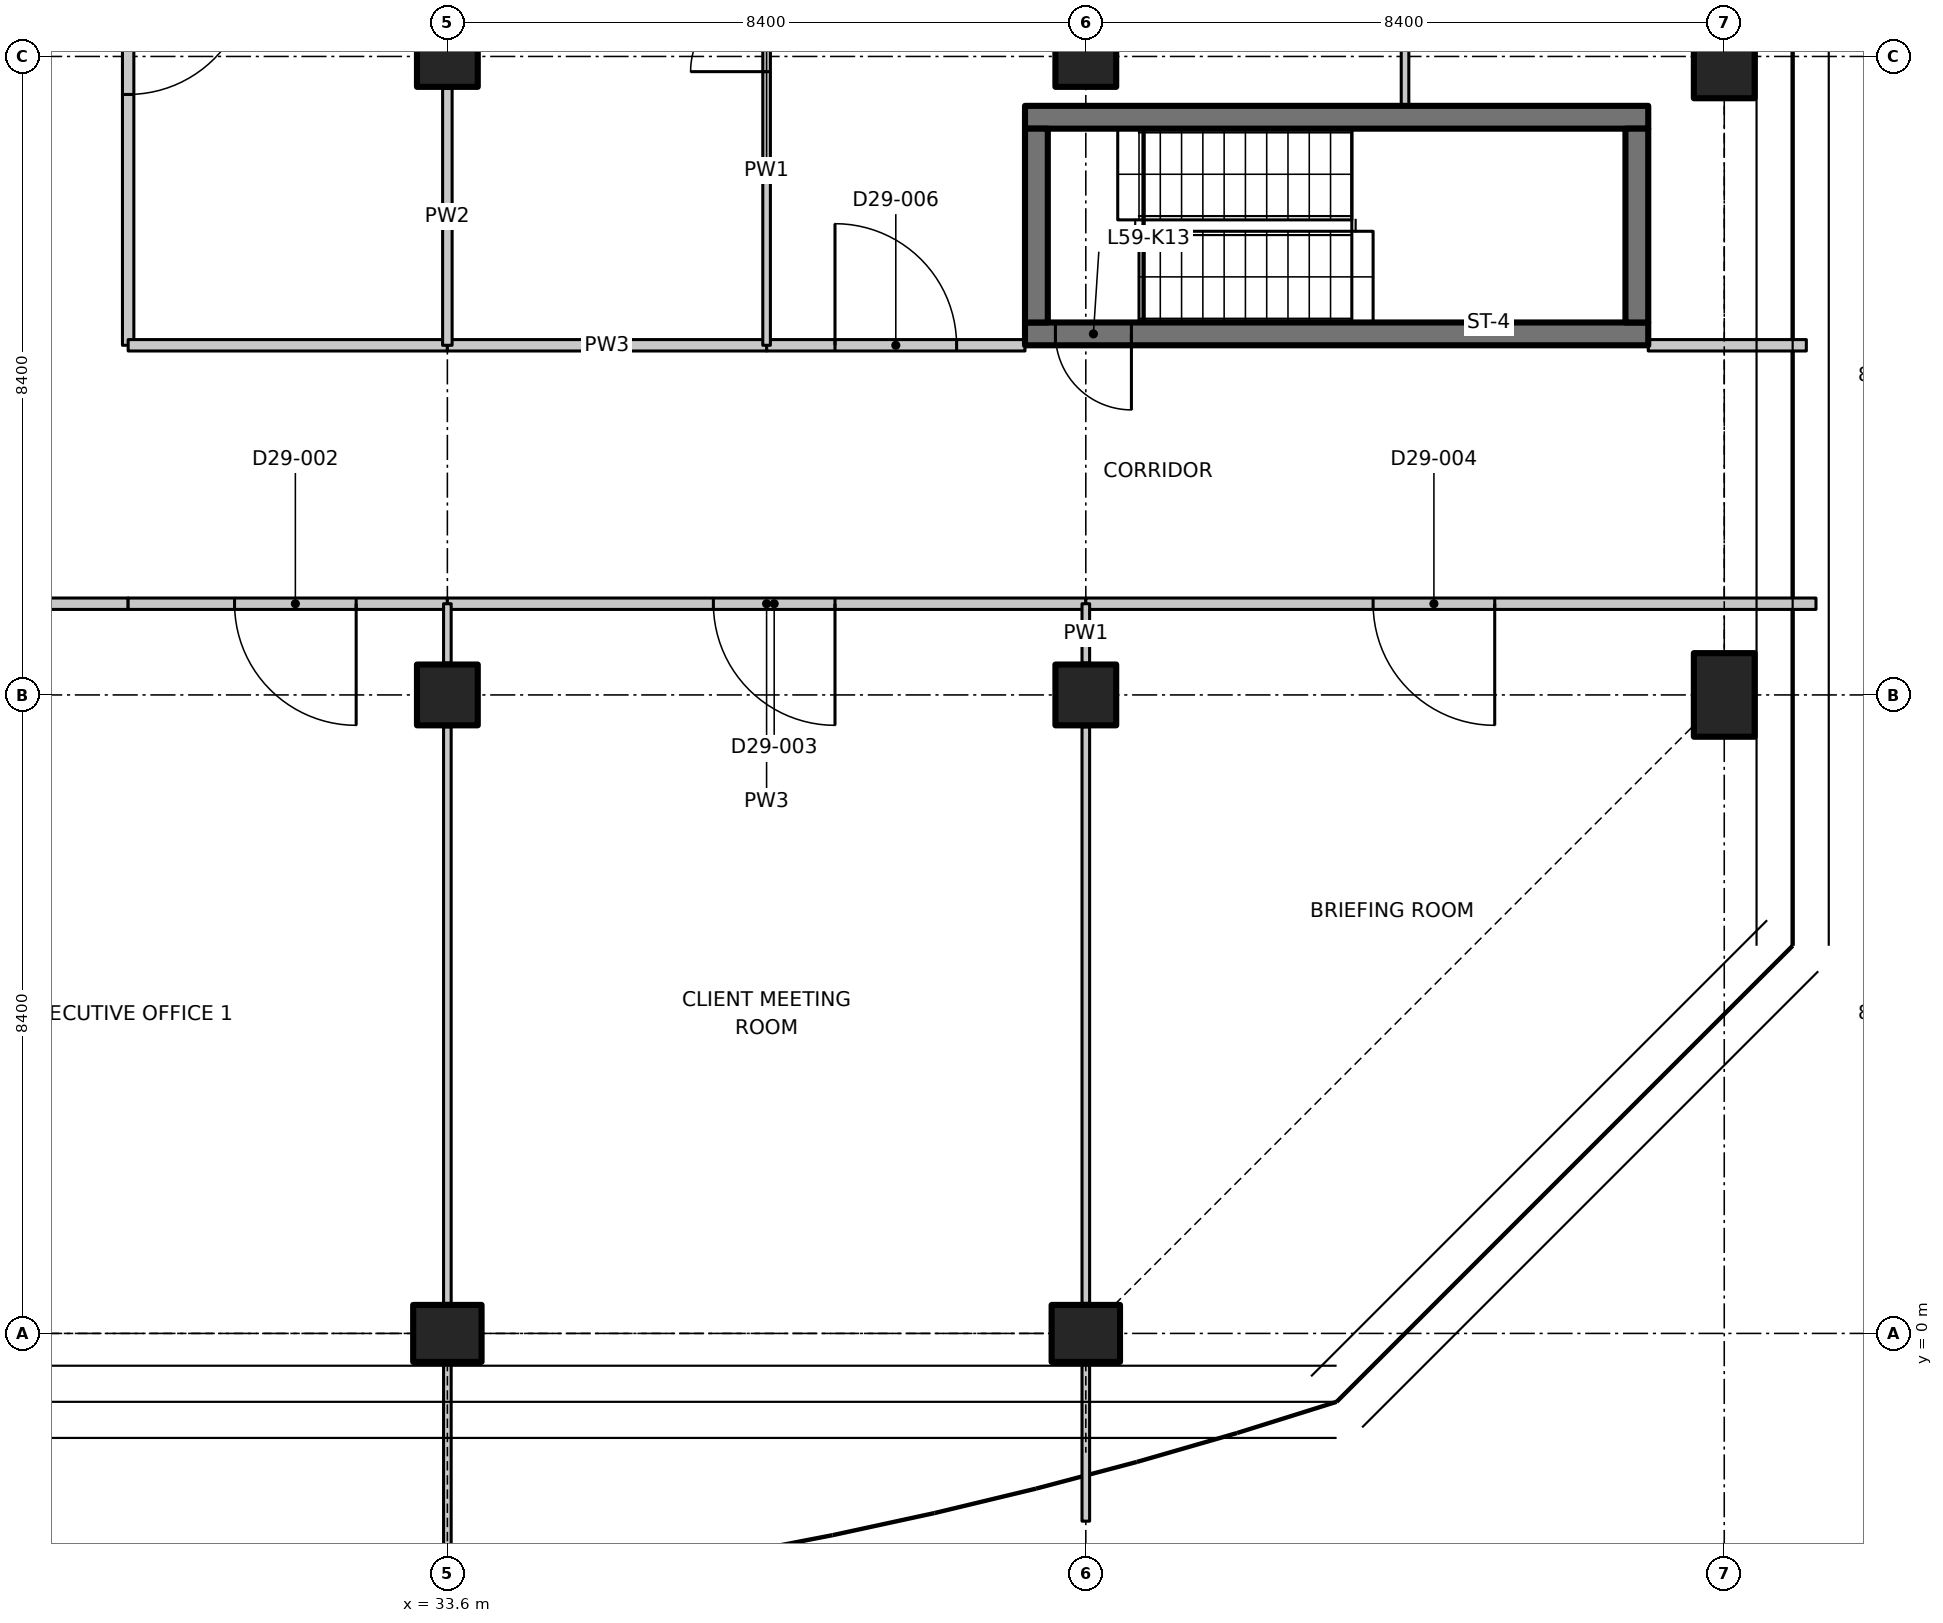
"""IFC4 building model, lengths in metres.
Left out: names, types, materials, properties, quantities, classifications, styles, units other than length and angle.
Written with IfcOpenShell. Run it as: python <this file> out.ifc"""

import sys

from ifc_helpers import new_model, si_unit, direction, frame, frame_2d, origin, origin_2d, place, context, subcontext, project, spatial, polyline, rectangle, outline, extrude, element, fill, save


model = new_model("IFC4")
c1 = context("Model", 3, precision=1e-05, world=origin(), true_north=direction((0.0, 1.0)))
c2 = subcontext(c1, "Body", "Model", "MODEL_VIEW")
j1 = project(units=[si_unit("LENGTHUNIT", "METRE"), si_unit("PLANEANGLEUNIT", "RADIAN")], contexts=[c1])
p1 = place(None, origin())
s1 = spatial("IfcSite", under=j1, at=p1, CompositionType="ELEMENT")
p2 = place(p1, origin())
s2 = spatial("IfcBuilding", under=s1, at=p2, CompositionType="ELEMENT")
p3 = place(p2, frame((0.0, 0.0, 233.7)))
s3 = spatial("IfcBuildingStorey", under=s2, at=p3, CompositionType="ELEMENT", Elevation=233.7)
p4 = place(p3, frame((33.6, 0.0, 0.0), z_axis=(0.0, 0.0, 1.0), x_axis=(0.0, 1.0, 0.0)))
e1 = element("IfcColumn", 1, at=p4, inside=s3, PredefinedType="COLUMN", context=c2, shape_type="SweptSolid", body=[
    extrude(rectangle(XDim=0.75, YDim=0.9, at=origin_2d()), origin(), (0.0, 0.0, 1.0), 3.35),
])
for number, where, z_axis, x_axis in (
    (2, (33.6, 8.4, 0.0), (0.0, 0.0, 1.0), (1.0, 0.0, 0.0)),
    (3, (33.6, 16.8, 0.0), (0.0, 0.0, 1.0), (1.0, 0.0, 0.0)),
):
    element("IfcColumn", number, at=place(p3, frame(where, z_axis=z_axis, x_axis=x_axis)), inside=s3, PredefinedType="COLUMN", context=c2, shape_type="SweptSolid", body=[
        extrude(rectangle(XDim=0.8, YDim=0.8, at=origin_2d()), origin(), (0.0, 0.0, 1.0), 3.35),
    ])
p5 = place(p3, frame((42.0, 0.0, 0.0), z_axis=(0.0, 0.0, 1.0), x_axis=(0.0, 1.0, 0.0)))
e4 = element("IfcColumn", 4, at=p5, inside=s3, PredefinedType="COLUMN", context=c2, shape_type="SweptSolid", body=[
    extrude(rectangle(XDim=0.75, YDim=0.9, at=origin_2d()), origin(), (0.0, 0.0, 1.0), 3.35),
])
for number, where, z_axis, x_axis in (
    (5, (42.0, 8.4, 0.0), (0.0, 0.0, 1.0), (1.0, 0.0, 0.0)),
    (6, (42.0, 16.8, 0.0), (0.0, 0.0, 1.0), (1.0, 0.0, 0.0)),
):
    element("IfcColumn", number, at=place(p3, frame(where, z_axis=z_axis, x_axis=x_axis)), inside=s3, PredefinedType="COLUMN", context=c2, shape_type="SweptSolid", body=[
        extrude(rectangle(XDim=0.8, YDim=0.8, at=origin_2d()), origin(), (0.0, 0.0, 1.0), 3.35),
    ])
for number, where, z_axis, x_axis in (
    (7, (50.4, 8.4, 0.0), (0.0, 0.0, 1.0), (1.0, 0.0, 0.0)),
    (8, (50.4, 16.8, 0.0), (0.0, 0.0, 1.0), (1.0, 0.0, 0.0)),
):
    element("IfcColumn", number, at=place(p3, frame(where, z_axis=z_axis, x_axis=x_axis)), inside=s3, PredefinedType="COLUMN", context=c2, shape_type="SweptSolid", body=[
        extrude(rectangle(XDim=0.8, YDim=1.1, at=origin_2d()), origin(), (0.0, 0.0, 1.0), 3.35),
    ])
p6 = place(p3, frame((49.4, 13.15, 0.0), z_axis=(0.0, 0.0, 1.0), x_axis=(-1.0, 0.0, 0.0)))
e9 = element("IfcWall", 9, at=p6, inside=s3, PredefinedType="SHEAR", context=c2, shape_type="SweptSolid", body=[
    extrude(rectangle(XDim=8.2, YDim=0.3, at=frame_2d((4.1, 0.0))), origin(), (0.0, 0.0, 1.0), 3.35),
])
p7 = place(p6, frame((6.8, 0.0, 0.0)))
e10 = element("IfcOpeningElement", 10, at=p7, cuts=e9, PredefinedType="OPENING", context=c2, shape_type="SweptSolid", body=[
    extrude(rectangle(XDim=1.0, YDim=2.1, at=frame_2d((0.5, 1.05))), frame((0.0, 0.16, 0.0), z_axis=(0.0, -1.0, 0.0), x_axis=(1.0, 0.0, 0.0)), (0.0, 0.0, 1.0), 0.32),
])
p8 = place(p3, frame((41.2, 16.0, 0.0), z_axis=(0.0, 0.0, 1.0), x_axis=(1.0, 0.0, 0.0)))
e11 = element("IfcWall", 11, at=p8, inside=s3, PredefinedType="SHEAR", context=c2, shape_type="SweptSolid", body=[
    extrude(rectangle(XDim=8.2, YDim=0.3, at=frame_2d((4.1, 0.0))), origin(), (0.0, 0.0, 1.0), 3.35),
])
for number, where, z_axis, x_axis in (
    (12, (41.35, 13.3, 0.0), (0.0, 0.0, 1.0), (0.0, 1.0, 0.0)),
    (13, (49.25, 13.3, 0.0), (0.0, 0.0, 1.0), (0.0, 1.0, 0.0)),
):
    element("IfcWall", number, at=place(p3, frame(where, z_axis=z_axis, x_axis=x_axis)), inside=s3, PredefinedType="SHEAR", context=c2, shape_type="SweptSolid", body=[
        extrude(rectangle(XDim=2.55, YDim=0.3, at=frame_2d((1.275, 0.0))), origin(), (0.0, 0.0, 1.0), 3.35),
    ])
p9 = place(p3, frame((29.4, 9.6, 0.0), z_axis=(0.0, 0.0, 1.0), x_axis=(-1.0, 0.0, 0.0)))
e14 = element("IfcWall", 14, at=p9, inside=s3, PredefinedType="PARTITIONING", context=c2, shape_type="SweptSolid", body=[
    extrude(rectangle(XDim=4.2, YDim=0.15, at=frame_2d((2.1, 0.0))), origin(), (0.0, 0.0, 1.0), 3.33),
])
p10 = place(p3, frame((29.4, 21.2, 0.0), z_axis=(0.0, 0.0, 1.0), x_axis=(0.0, -1.0, 0.0)))
e15 = element("IfcWall", 15, at=p10, inside=s3, PredefinedType="PARTITIONING", context=c2, shape_type="SweptSolid", body=[
    extrude(rectangle(XDim=8.2, YDim=0.15, at=frame_2d((4.1, 0.0))), origin(), (0.0, 0.0, 1.0), 3.33),
])
p11 = place(p10, frame((3.3, 0.0, 0.0)))
e16 = element("IfcOpeningElement", 16, at=p11, cuts=e15, PredefinedType="OPENING", context=c2, shape_type="SweptSolid", body=[
    extrude(rectangle(XDim=1.6, YDim=2.1, at=frame_2d((0.8, 1.05))), frame((0.0, 0.085, 0.0), z_axis=(0.0, -1.0, 0.0), x_axis=(1.0, 0.0, 0.0)), (0.0, 0.0, 1.0), 0.17),
])
p12 = place(p3, frame((33.6, 9.6, 0.0), z_axis=(0.0, 0.0, 1.0), x_axis=(-1.0, 0.0, 0.0)))
e17 = element("IfcWall", 17, at=p12, inside=s3, PredefinedType="PARTITIONING", context=c2, shape_type="SweptSolid", body=[
    extrude(rectangle(XDim=4.2, YDim=0.15, at=frame_2d((2.1, 0.0))), origin(), (0.0, 0.0, 1.0), 3.33),
])
p13 = place(p12, frame((1.2, 0.0, 0.0)))
e18 = element("IfcOpeningElement", 18, at=p13, cuts=e17, PredefinedType="OPENING", context=c2, shape_type="SweptSolid", body=[
    extrude(rectangle(XDim=1.6, YDim=2.1, at=frame_2d((0.8, 1.05))), frame((0.0, 0.085, 0.0), z_axis=(0.0, -1.0, 0.0), x_axis=(1.0, 0.0, 0.0)), (0.0, 0.0, 1.0), 0.17),
])
p14 = place(p3, frame((42.0, 9.6, 0.0), z_axis=(0.0, 0.0, 1.0), x_axis=(-1.0, 0.0, 0.0)))
e19 = element("IfcWall", 19, at=p14, inside=s3, PredefinedType="PARTITIONING", context=c2, shape_type="SweptSolid", body=[
    extrude(rectangle(XDim=8.4, YDim=0.15, at=frame_2d((4.2, 0.0))), origin(), (0.0, 0.0, 1.0), 3.33),
])
p15 = place(p14, frame((3.3, 0.0, 0.0)))
e20 = element("IfcOpeningElement", 20, at=p15, cuts=e19, PredefinedType="OPENING", context=c2, shape_type="SweptSolid", body=[
    extrude(rectangle(XDim=1.6, YDim=2.1, at=frame_2d((0.8, 1.05))), frame((0.0, 0.085, 0.0), z_axis=(0.0, -1.0, 0.0), x_axis=(1.0, 0.0, 0.0)), (0.0, 0.0, 1.0), 0.17),
])
p16 = place(p3, frame((51.607, 9.6, 0.0), z_axis=(0.0, 0.0, 1.0), x_axis=(-1.0, 0.0, 0.0)))
e21 = element("IfcWall", 21, at=p16, inside=s3, PredefinedType="PARTITIONING", context=c2, shape_type="SweptSolid", body=[
    extrude(outline(polyline([(0.0, 0.0), (9.607, 0.0), (9.607, 3.33), (1.657, 3.33), (1.655, 2.98), (0.759, 2.98), (0.757, 3.33), (0.127, 3.33), (0.0, 3.33), (0.0, 0.0)])), frame((0.0, 0.075, 0.0), z_axis=(0.0, -1.0, 0.0), x_axis=(1.0, 0.0, 0.0)), (0.0, 0.0, 1.0), 0.15),
])
p17 = place(p16, frame((4.227, 0.0, 0.0)))
e22 = element("IfcOpeningElement", 22, at=p17, cuts=e21, PredefinedType="OPENING", context=c2, shape_type="SweptSolid", body=[
    extrude(rectangle(XDim=1.6, YDim=2.1, at=frame_2d((0.8, 1.05))), frame((0.0, 0.085, 0.0), z_axis=(0.0, -1.0, 0.0), x_axis=(1.0, 0.0, 0.0)), (0.0, 0.0, 1.0), 0.17),
])
p18 = place(p3, frame((29.4, 13.0, 0.0), z_axis=(0.0, 0.0, 1.0), x_axis=(1.0, 0.0, 0.0)))
e23 = element("IfcWall", 23, at=p18, inside=s3, PredefinedType="PARTITIONING", context=c2, shape_type="SweptSolid", body=[
    extrude(rectangle(XDim=4.2, YDim=0.15, at=frame_2d((2.1, 0.0))), origin(), (0.0, 0.0, 1.0), 3.33),
])
p19 = place(p3, frame((37.8, 13.0, 0.0), z_axis=(0.0, 0.0, 1.0), x_axis=(1.0, 0.0, 0.0)))
e24 = element("IfcWall", 24, at=p19, inside=s3, PredefinedType="PARTITIONING", context=c2, shape_type="SweptSolid", body=[
    extrude(rectangle(XDim=3.4, YDim=0.15, at=frame_2d((1.7, 0.0))), origin(), (0.0, 0.0, 1.0), 3.33),
])
p20 = place(p19, frame((0.9, 0.0, 0.0)))
e25 = element("IfcOpeningElement", 25, at=p20, cuts=e24, PredefinedType="OPENING", context=c2, shape_type="SweptSolid", body=[
    extrude(rectangle(XDim=1.6, YDim=2.1, at=frame_2d((0.8, 1.05))), frame((0.0, 0.085, 0.0), z_axis=(0.0, -1.0, 0.0), x_axis=(1.0, 0.0, 0.0)), (0.0, 0.0, 1.0), 0.17),
])
p21 = place(p3, frame((49.4, 13.0, 0.0), z_axis=(0.0, 0.0, 1.0), x_axis=(1.0, 0.0, 0.0)))
e26 = element("IfcWall", 26, at=p21, inside=s3, PredefinedType="PARTITIONING", context=c2, shape_type="SweptSolid", body=[
    extrude(rectangle(XDim=2.08, YDim=0.15, at=frame_2d((1.04, 0.0))), origin(), (0.0, 0.0, 1.0), 2.98),
])
p22 = place(p3, frame((33.6, 13.0, 0.0), z_axis=(0.0, 0.0, 1.0), x_axis=(1.0, 0.0, 0.0)))
e27 = element("IfcWall", 27, at=p22, inside=s3, PredefinedType="PARTITIONING", context=c2, shape_type="SweptSolid", body=[
    extrude(rectangle(XDim=4.2, YDim=0.15, at=frame_2d((2.1, 0.0))), origin(), (0.0, 0.0, 1.0), 3.33),
])
p23 = place(p3, frame((33.6, 9.6, 0.0), z_axis=(0.0, 0.0, 1.0), x_axis=(0.0, -1.0, 0.0)))
e28 = element("IfcWall", 28, at=p23, inside=s3, PredefinedType="PARTITIONING", context=c2, shape_type="SweptSolid", body=[
    extrude(rectangle(XDim=0.78, YDim=0.1, at=frame_2d((0.39, 0.0))), origin(), (0.0, 0.0, 1.0), 3.33),
])
p24 = place(p3, frame((33.6, 7.98, 0.0), z_axis=(0.0, 0.0, 1.0), x_axis=(0.0, -1.0, 0.0)))
e29 = element("IfcWall", 29, at=p24, inside=s3, PredefinedType="PARTITIONING", context=c2, shape_type="SweptSolid", body=[
    extrude(outline(polyline([(0.0, 0.0), (7.585, 0.0), (7.585, 2.98), (7.532, 2.98), (7.53, 3.33), (0.0, 3.33), (0.0, 0.0)])), frame((0.0, 0.05, 0.0), z_axis=(0.0, -1.0, 0.0), x_axis=(1.0, 0.0, 0.0)), (0.0, 0.0, 1.0), 0.1),
])
p25 = place(p3, frame((33.6, -0.395, 0.0), z_axis=(0.0, 0.0, 1.0), x_axis=(0.0, -1.0, 0.0)))
e30 = element("IfcWall", 30, at=p25, inside=s3, PredefinedType="PARTITIONING", context=c2, shape_type="SweptSolid", body=[
    extrude(rectangle(XDim=3.485, YDim=0.1, at=frame_2d((1.743, 0.0))), origin(), (0.0, 0.0, 1.0), 2.98),
])
p26 = place(p3, frame((42.0, 9.6, 0.0), z_axis=(0.0, 0.0, 1.0), x_axis=(0.0, -1.0, 0.0)))
e31 = element("IfcWall", 31, at=p26, inside=s3, PredefinedType="PARTITIONING", context=c2, shape_type="SweptSolid", body=[
    extrude(rectangle(XDim=0.78, YDim=0.1, at=frame_2d((0.39, 0.0))), origin(), (0.0, 0.0, 1.0), 3.33),
])
p27 = place(p3, frame((42.0, 7.98, 0.0), z_axis=(0.0, 0.0, 1.0), x_axis=(0.0, -1.0, 0.0)))
e32 = element("IfcWall", 32, at=p27, inside=s3, PredefinedType="PARTITIONING", context=c2, shape_type="SweptSolid", body=[
    extrude(outline(polyline([(0.0, 0.0), (7.585, 0.0), (7.585, 2.98), (7.316, 2.98), (7.314, 3.33), (0.0, 3.33), (0.0, 0.0)])), frame((0.0, 0.05, 0.0), z_axis=(0.0, -1.0, 0.0), x_axis=(1.0, 0.0, 0.0)), (0.0, 0.0, 1.0), 0.1),
])
p28 = place(p3, frame((42.0, -0.395, 0.0), z_axis=(0.0, 0.0, 1.0), x_axis=(0.0, -1.0, 0.0)))
e33 = element("IfcWall", 33, at=p28, inside=s3, PredefinedType="PARTITIONING", context=c2, shape_type="SweptSolid", body=[
    extrude(rectangle(XDim=2.075, YDim=0.1, at=frame_2d((1.038, 0.0))), origin(), (0.0, 0.0, 1.0), 2.98),
])
p29 = place(p3, frame((33.6, 16.38, 0.0), z_axis=(0.0, 0.0, 1.0), x_axis=(0.0, -1.0, 0.0)))
e34 = element("IfcWall", 34, at=p29, inside=s3, PredefinedType="PARTITIONING", context=c2, shape_type="SweptSolid", body=[
    extrude(rectangle(XDim=3.38, YDim=0.125, at=frame_2d((1.69, 0.0))), origin(), (0.0, 0.0, 1.0), 3.33),
])
p30 = place(p3, frame((46.2, 20.2, 0.0), z_axis=(0.0, 0.0, 1.0), x_axis=(0.0, -1.0, 0.0)))
e35 = element("IfcWall", 35, at=p30, inside=s3, PredefinedType="PARTITIONING", context=c2, shape_type="SweptSolid", body=[
    extrude(rectangle(XDim=4.05, YDim=0.1, at=frame_2d((2.025, 0.0))), origin(), (0.0, 0.0, 1.0), 3.33),
])
p31 = place(p30, frame((1.5, 0.0, 0.0)))
e36 = element("IfcOpeningElement", 36, at=p31, cuts=e35, PredefinedType="OPENING", context=c2, shape_type="SweptSolid", body=[
    extrude(rectangle(XDim=1.0, YDim=2.1, at=frame_2d((0.5, 1.05))), frame((0.0, 0.06, 0.0), z_axis=(0.0, -1.0, 0.0), x_axis=(1.0, 0.0, 0.0)), (0.0, 0.0, 1.0), 0.12),
])
p32 = place(p3, frame((37.8, 13.0, 0.0), z_axis=(0.0, 0.0, 1.0), x_axis=(0.0, 1.0, 0.0)))
e37 = element("IfcWall", 37, at=p32, inside=s3, PredefinedType="PARTITIONING", context=c2, shape_type="SweptSolid", body=[
    extrude(rectangle(XDim=8.4, YDim=0.1, at=frame_2d((4.2, 0.0))), origin(), (0.0, 0.0, 1.0), 3.33),
])
p33 = place(p32, frame((3.6, 0.0, 0.0)))
e38 = element("IfcOpeningElement", 38, at=p33, cuts=e37, PredefinedType="OPENING", context=c2, shape_type="SweptSolid", body=[
    extrude(rectangle(XDim=1.0, YDim=2.1, at=frame_2d((0.5, 1.05))), frame((0.0, 0.06, 0.0), z_axis=(0.0, -1.0, 0.0), x_axis=(1.0, 0.0, 0.0)), (0.0, 0.0, 1.0), 0.12),
])
p34 = place(p7, origin())
e39 = element("IfcDoor", 39, at=p34, inside=s3, OperationType="SINGLE_SWING_RIGHT", PredefinedType="DOOR", context=c2, shape_type="SweptSolid", body=[
    extrude(rectangle(XDim=1.0, YDim=2.1, at=frame_2d((0.5, 1.05))), frame((0.0, 0.025, 0.0), z_axis=(0.0, -1.0, 0.0), x_axis=(1.0, 0.0, 0.0)), (0.0, 0.0, 1.0), 0.05),
])
fill(e10, e39)
p35 = place(p13, origin())
e40 = element("IfcDoor", 40, at=p35, inside=s3, OperationType="DOUBLE_DOOR_SINGLE_SWING", PredefinedType="DOOR", context=c2, shape_type="SweptSolid", body=[
    extrude(rectangle(XDim=1.6, YDim=2.1, at=frame_2d((0.8, 1.05))), frame((0.0, 0.025, 0.0), z_axis=(0.0, -1.0, 0.0), x_axis=(1.0, 0.0, 0.0)), (0.0, 0.0, 1.0), 0.05),
])
fill(e18, e40)
p36 = place(p15, origin())
e41 = element("IfcDoor", 41, at=p36, inside=s3, OperationType="DOUBLE_DOOR_SINGLE_SWING", PredefinedType="DOOR", context=c2, shape_type="SweptSolid", body=[
    extrude(rectangle(XDim=1.6, YDim=2.1, at=frame_2d((0.8, 1.05))), frame((0.0, 0.025, 0.0), z_axis=(0.0, -1.0, 0.0), x_axis=(1.0, 0.0, 0.0)), (0.0, 0.0, 1.0), 0.05),
])
fill(e20, e41)
p37 = place(p17, origin())
e42 = element("IfcDoor", 42, at=p37, inside=s3, OperationType="DOUBLE_DOOR_SINGLE_SWING", PredefinedType="DOOR", context=c2, shape_type="SweptSolid", body=[
    extrude(rectangle(XDim=1.6, YDim=2.1, at=frame_2d((0.8, 1.05))), frame((0.0, 0.025, 0.0), z_axis=(0.0, -1.0, 0.0), x_axis=(1.0, 0.0, 0.0)), (0.0, 0.0, 1.0), 0.05),
])
fill(e22, e42)
p38 = place(p11, origin())
e43 = element("IfcDoor", 43, at=p38, inside=s3, OperationType="DOUBLE_DOOR_SINGLE_SWING", PredefinedType="DOOR", context=c2, shape_type="SweptSolid", body=[
    extrude(rectangle(XDim=1.6, YDim=2.1, at=frame_2d((0.8, 1.05))), frame((0.0, 0.025, 0.0), z_axis=(0.0, -1.0, 0.0), x_axis=(1.0, 0.0, 0.0)), (0.0, 0.0, 1.0), 0.05),
])
fill(e16, e43)
p39 = place(p20, origin())
e44 = element("IfcDoor", 44, at=p39, inside=s3, OperationType="DOUBLE_DOOR_SINGLE_SWING", PredefinedType="DOOR", context=c2, shape_type="SweptSolid", body=[
    extrude(rectangle(XDim=1.6, YDim=2.1, at=frame_2d((0.8, 1.05))), frame((0.0, 0.025, 0.0), z_axis=(0.0, -1.0, 0.0), x_axis=(1.0, 0.0, 0.0)), (0.0, 0.0, 1.0), 0.05),
])
fill(e25, e44)
p40 = place(p33, origin())
e45 = element("IfcDoor", 45, at=p40, inside=s3, OperationType="SINGLE_SWING_LEFT", PredefinedType="DOOR", context=c2, shape_type="SweptSolid", body=[
    extrude(rectangle(XDim=1.0, YDim=2.1, at=frame_2d((0.5, 1.05))), frame((0.0, 0.025, 0.0), z_axis=(0.0, -1.0, 0.0), x_axis=(1.0, 0.0, 0.0)), (0.0, 0.0, 1.0), 0.05),
])
fill(e38, e45)
save(model, sys.argv[1])
